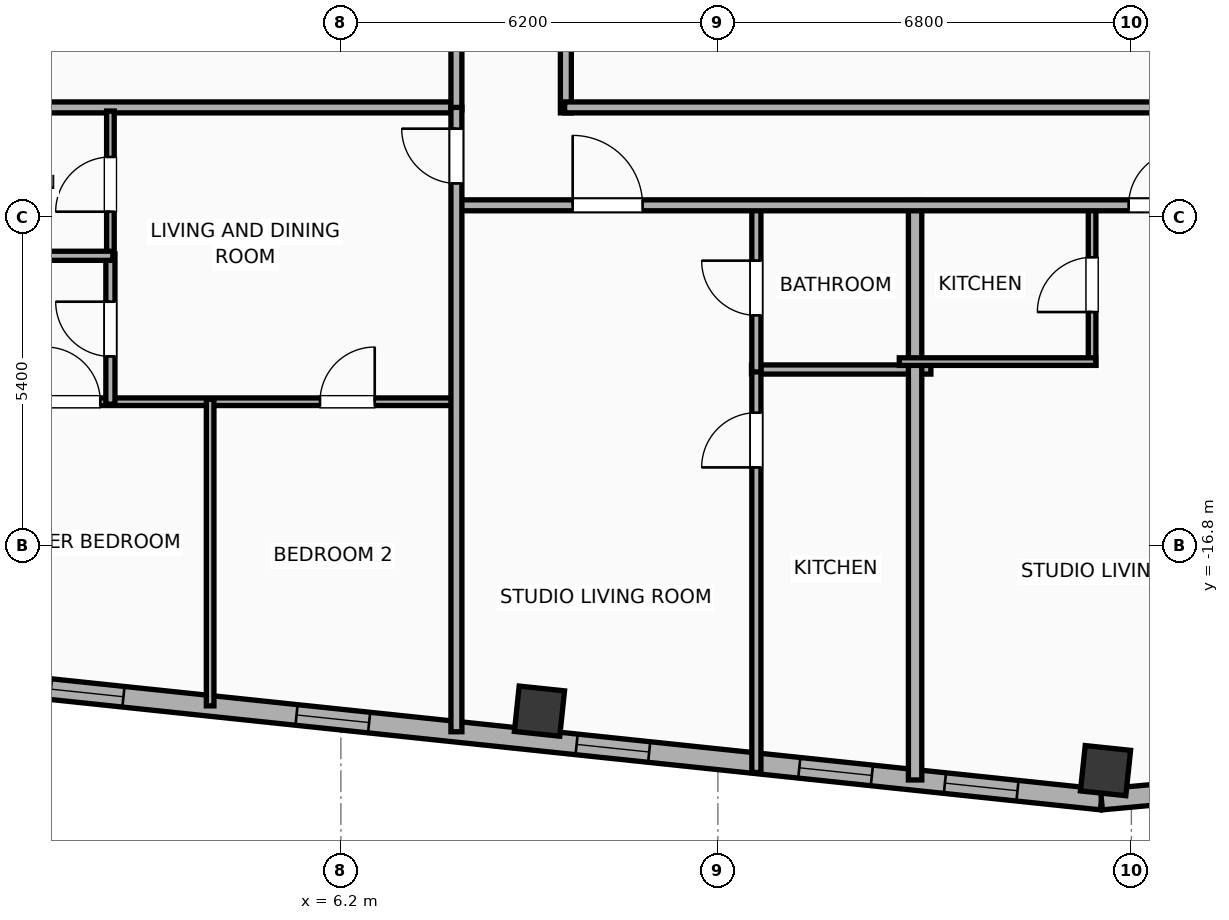
"""IFC4 building model, lengths in metres.
Left out: names, types, materials, properties, quantities, classifications, styles, units other than length and angle.
Written with IfcOpenShell. Run it as: python <this file> out.ifc"""

import sys

from ifc_helpers import new_model, si_unit, direction, frame, frame_2d, origin, origin_2d, place, context, subcontext, project, spatial, rectangle, hollow_rectangle, extrude, element, fill, save


model = new_model("IFC4")
c1 = context("Model", 3, precision=1e-05, world=origin(), true_north=direction((0.0, 1.0)))
c2 = subcontext(c1, "Body", "Model", "MODEL_VIEW")
j1 = project(units=[si_unit("LENGTHUNIT", "METRE"), si_unit("PLANEANGLEUNIT", "RADIAN")], contexts=[c1])
p1 = place(None, origin())
s1 = spatial("IfcSite", under=j1, at=p1, CompositionType="ELEMENT")
p2 = place(p1, origin())
s2 = spatial("IfcBuilding", under=s1, at=p2, CompositionType="ELEMENT")
p3 = place(p2, frame((0.0, 0.0, 287.3)))
s3 = spatial("IfcBuildingStorey", under=s2, at=p3, CompositionType="ELEMENT", Elevation=287.3)
for number, where, z_axis, x_axis in (
    (1, (9.466, -19.518, 0.0), (0.0, 0.0, 1.0), (0.995, -0.105, 0.0)),
    (2, (18.775, -20.497, 0.0), (0.0, 0.0, 1.0), (0.995, -0.105, 0.0)),
):
    element("IfcColumn", number, at=place(p3, frame(where, z_axis=z_axis, x_axis=x_axis)), inside=s3, PredefinedType="COLUMN", context=c2, shape_type="SweptSolid", body=[
        extrude(hollow_rectangle(XDim=0.75, YDim=0.75, WallThickness=0.025, at=origin_2d()), origin(), (0.0, 0.0, 1.0), 3.9),
    ])
p4 = place(p3, frame((18.708, -20.972, 0.0), z_axis=(0.0, 0.0, 1.0), x_axis=(-0.994521888554, 0.104528528102, 0.0)))
e3 = element("IfcWall", 3, at=p4, inside=s3, PredefinedType="ELEMENTEDWALL", context=c2, shape_type="SweptSolid", body=[
    extrude(rectangle(XDim=46.766, YDim=0.34, at=frame_2d((23.383, 0.0))), origin(), (0.0, 0.0, 1.0), 3.635),
])
p5 = place(p4, frame((23.833, 0.0, 0.75)))
e4 = element("IfcOpeningElement", 4, at=p5, cuts=e3, PredefinedType="OPENING", context=c2, shape_type="SweptSolid", body=[
    extrude(rectangle(XDim=2.4, YDim=2.1, at=frame_2d((1.2, 1.05))), frame((0.0, 0.18, 0.0), z_axis=(0.0, -1.0, 0.0), x_axis=(1.0, 0.0, 0.0)), (0.0, 0.0, 1.0), 0.36),
])
p6 = place(p4, frame((38.622, 0.0, 0.75)))
e5 = element("IfcOpeningElement", 5, at=p6, cuts=e3, PredefinedType="OPENING", context=c2, shape_type="SweptSolid", body=[
    extrude(rectangle(XDim=2.4, YDim=2.1, at=frame_2d((1.2, 1.05))), frame((0.0, 0.18, 0.0), z_axis=(0.0, -1.0, 0.0), x_axis=(1.0, 0.0, 0.0)), (0.0, 0.0, 1.0), 0.36),
])
p7 = place(p4, frame((44.402, 0.0, 0.75)))
e6 = element("IfcOpeningElement", 6, at=p7, cuts=e3, PredefinedType="OPENING", context=c2, shape_type="SweptSolid", body=[
    extrude(rectangle(XDim=1.2, YDim=2.05, at=frame_2d((0.6, 1.025))), frame((0.0, 0.18, 0.0), z_axis=(0.0, -1.0, 0.0), x_axis=(1.0, 0.0, 0.0)), (0.0, 0.0, 1.0), 0.36),
])
p8 = place(p4, frame((42.358, 0.0, 0.75)))
e7 = element("IfcOpeningElement", 7, at=p8, cuts=e3, PredefinedType="OPENING", context=c2, shape_type="SweptSolid", body=[
    extrude(rectangle(XDim=1.2, YDim=2.05, at=frame_2d((0.6, 1.025))), frame((0.0, 0.18, 0.0), z_axis=(0.0, -1.0, 0.0), x_axis=(1.0, 0.0, 0.0)), (0.0, 0.0, 1.0), 0.36),
])
p9 = place(p4, frame((34.933, 0.0, 0.75)))
e8 = element("IfcOpeningElement", 8, at=p9, cuts=e3, PredefinedType="OPENING", context=c2, shape_type="SweptSolid", body=[
    extrude(rectangle(XDim=1.2, YDim=2.05, at=frame_2d((0.6, 1.025))), frame((0.0, 0.18, 0.0), z_axis=(0.0, -1.0, 0.0), x_axis=(1.0, 0.0, 0.0)), (0.0, 0.0, 1.0), 0.36),
])
p10 = place(p4, frame((28.704, 0.0, 0.75)))
e9 = element("IfcOpeningElement", 9, at=p10, cuts=e3, PredefinedType="OPENING", context=c2, shape_type="SweptSolid", body=[
    extrude(rectangle(XDim=1.2, YDim=2.05, at=frame_2d((0.6, 1.025))), frame((0.0, 0.18, 0.0), z_axis=(0.0, -1.0, 0.0), x_axis=(1.0, 0.0, 0.0)), (0.0, 0.0, 1.0), 0.36),
])
p11 = place(p4, frame((30.849, 0.0, 0.75)))
e10 = element("IfcOpeningElement", 10, at=p11, cuts=e3, PredefinedType="OPENING", context=c2, shape_type="SweptSolid", body=[
    extrude(rectangle(XDim=1.2, YDim=2.05, at=frame_2d((0.6, 1.025))), frame((0.0, 0.18, 0.0), z_axis=(0.0, -1.0, 0.0), x_axis=(1.0, 0.0, 0.0)), (0.0, 0.0, 1.0), 0.36),
])
p12 = place(p4, frame((7.479, 0.0, 0.75)))
e11 = element("IfcOpeningElement", 11, at=p12, cuts=e3, PredefinedType="OPENING", context=c2, shape_type="SweptSolid", body=[
    extrude(rectangle(XDim=1.2, YDim=2.05, at=frame_2d((0.6, 1.025))), frame((0.0, 0.18, 0.0), z_axis=(0.0, -1.0, 0.0), x_axis=(1.0, 0.0, 0.0)), (0.0, 0.0, 1.0), 0.36),
])
p13 = place(p4, frame((3.796, 0.0, 0.75)))
e12 = element("IfcOpeningElement", 12, at=p13, cuts=e3, PredefinedType="OPENING", context=c2, shape_type="SweptSolid", body=[
    extrude(rectangle(XDim=1.2, YDim=2.05, at=frame_2d((0.6, 1.025))), frame((0.0, 0.18, 0.0), z_axis=(0.0, -1.0, 0.0), x_axis=(1.0, 0.0, 0.0)), (0.0, 0.0, 1.0), 0.36),
])
p14 = place(p4, frame((1.388, 0.0, 0.75)))
e13 = element("IfcOpeningElement", 13, at=p14, cuts=e3, PredefinedType="OPENING", context=c2, shape_type="SweptSolid", body=[
    extrude(rectangle(XDim=1.2, YDim=2.05, at=frame_2d((0.6, 1.025))), frame((0.0, 0.18, 0.0), z_axis=(0.0, -1.0, 0.0), x_axis=(1.0, 0.0, 0.0)), (0.0, 0.0, 1.0), 0.36),
])
p15 = place(p4, frame((20.254, 0.0, 0.75)))
e14 = element("IfcOpeningElement", 14, at=p15, cuts=e3, PredefinedType="OPENING", context=c2, shape_type="SweptSolid", body=[
    extrude(rectangle(XDim=1.2, YDim=2.05, at=frame_2d((0.6, 1.025))), frame((0.0, 0.18, 0.0), z_axis=(0.0, -1.0, 0.0), x_axis=(1.0, 0.0, 0.0)), (0.0, 0.0, 1.0), 0.36),
])
p16 = place(p4, frame((16.172, 0.0, 0.75)))
e15 = element("IfcOpeningElement", 15, at=p16, cuts=e3, PredefinedType="OPENING", context=c2, shape_type="SweptSolid", body=[
    extrude(rectangle(XDim=1.2, YDim=2.05, at=frame_2d((0.6, 1.025))), frame((0.0, 0.18, 0.0), z_axis=(0.0, -1.0, 0.0), x_axis=(1.0, 0.0, 0.0)), (0.0, 0.0, 1.0), 0.36),
])
p17 = place(p4, frame((12.11, 0.0, 0.75)))
e16 = element("IfcOpeningElement", 16, at=p17, cuts=e3, PredefinedType="OPENING", context=c2, shape_type="SweptSolid", body=[
    extrude(rectangle(XDim=1.2, YDim=2.05, at=frame_2d((0.6, 1.025))), frame((0.0, 0.18, 0.0), z_axis=(0.0, -1.0, 0.0), x_axis=(1.0, 0.0, 0.0)), (0.0, 0.0, 1.0), 0.36),
])
p18 = place(p3, frame((20.056, -20.848, 0.0), z_axis=(0.0, 0.0, 1.0), x_axis=(-0.995813013343, -0.091413579172, 0.0)))
e17 = element("IfcWall", 17, at=p18, inside=s3, PredefinedType="ELEMENTEDWALL", context=c2, shape_type="SweptSolid", body=[
    extrude(rectangle(XDim=1.354, YDim=0.34, at=frame_2d((0.677, 0.0))), origin(), (0.0, 0.0, 1.0), 3.635),
])
p19 = place(p3, frame((9.9, -9.68, 0.0), z_axis=(0.0, 0.0, 1.0), x_axis=(0.0, 1.0, 0.0)))
e18 = element("IfcWall", 18, at=p19, inside=s3, PredefinedType="PARTITIONING", context=c2, shape_type="SweptSolid", body=[
    extrude(rectangle(XDim=19.36, YDim=0.18, at=frame_2d((9.68, 0.0))), origin(), (0.0, 0.0, 1.0), 3.635),
])
p20 = place(p19, frame((8.162, 0.0, 0.0)))
e19 = element("IfcOpeningElement", 19, at=p20, cuts=e18, PredefinedType="OPENING", context=c2, shape_type="SweptSolid", body=[
    extrude(rectangle(XDim=1.1, YDim=2.05, at=frame_2d((0.55, 1.025))), frame((0.0, 0.1, 0.0), z_axis=(0.0, -1.0, 0.0), x_axis=(1.0, 0.0, 0.0)), (0.0, 0.0, 1.0), 0.2),
])
p21 = place(p3, frame((9.88, -9.59, 0.0), z_axis=(0.0, 0.0, 1.0), x_axis=(1.0, 0.0, 0.0)))
e20 = element("IfcWall", 20, at=p21, inside=s3, PredefinedType="PARTITIONING", context=c2, shape_type="SweptSolid", body=[
    extrude(rectangle(XDim=13.49, YDim=0.18, at=frame_2d((6.745, 0.0))), origin(), (0.0, 0.0, 1.0), 3.635),
])
p22 = place(p3, frame((-8.15, -9.59, 0.0), z_axis=(0.0, 0.0, 1.0), x_axis=(1.0, 0.0, 0.0)))
e21 = element("IfcWall", 21, at=p22, inside=s3, PredefinedType="PARTITIONING", context=c2, shape_type="SweptSolid", body=[
    extrude(rectangle(XDim=16.3, YDim=0.18, at=frame_2d((8.15, 0.0))), origin(), (0.0, 0.0, 1.0), 3.635),
])
p23 = place(p3, frame((8.1, -9.63, 0.0), z_axis=(0.0, 0.0, 1.0), x_axis=(0.0, 1.0, 0.0)))
e22 = element("IfcWall", 22, at=p23, inside=s3, PredefinedType="PARTITIONING", context=c2, shape_type="SweptSolid", body=[
    extrude(rectangle(XDim=19.26, YDim=0.18, at=frame_2d((9.63, 0.0))), origin(), (0.0, 0.0, 1.0), 3.635),
])
p24 = place(p3, frame((12.953, -13.9, 0.0), z_axis=(0.0, 0.0, 1.0), x_axis=(1.0, 0.0, 0.0)))
e23 = element("IfcWall", 23, at=p24, inside=s3, PredefinedType="PLUMBINGWALL", context=c2, shape_type="SweptSolid", body=[
    extrude(rectangle(XDim=2.95, YDim=0.15, at=frame_2d((1.475, 0.0))), origin(), (0.0, 0.0, 1.0), 3.635),
])
p25 = place(p3, frame((13.033, -20.527, 0.0), z_axis=(0.0, 0.0, 1.0), x_axis=(0.0, 1.0, 0.0)))
e24 = element("IfcWall", 24, at=p25, inside=s3, PredefinedType="PLUMBINGWALL", context=c2, shape_type="SweptSolid", body=[
    extrude(rectangle(XDim=6.667, YDim=0.15, at=frame_2d((3.333, 0.0))), origin(), (0.0, 0.0, 1.0), 3.635),
])
p26 = place(p25, frame((5.017, 0.0, 0.0)))
e25 = element("IfcOpeningElement", 25, at=p26, cuts=e24, PredefinedType="OPENING", context=c2, shape_type="SweptSolid", body=[
    extrude(rectangle(XDim=0.9, YDim=2.05, at=frame_2d((0.45, 1.025))), frame((0.0, 0.085, 0.0), z_axis=(0.0, -1.0, 0.0), x_axis=(1.0, 0.0, 0.0)), (0.0, 0.0, 1.0), 0.17),
])
p27 = place(p3, frame((13.033, -13.94, 0.0), z_axis=(0.0, 0.0, 1.0), x_axis=(0.0, 1.0, 0.0)))
e26 = element("IfcWall", 26, at=p27, inside=s3, PredefinedType="PLUMBINGWALL", context=c2, shape_type="SweptSolid", body=[
    extrude(rectangle(XDim=2.76, YDim=0.15, at=frame_2d((1.38, 0.0))), origin(), (0.0, 0.0, 1.0), 3.635),
])
p28 = place(p27, frame((0.93, 0.0, 0.0)))
e27 = element("IfcOpeningElement", 27, at=p28, cuts=e26, PredefinedType="OPENING", context=c2, shape_type="SweptSolid", body=[
    extrude(rectangle(XDim=0.9, YDim=2.05, at=frame_2d((0.45, 1.025))), frame((0.0, 0.085, 0.0), z_axis=(0.0, -1.0, 0.0), x_axis=(1.0, 0.0, 0.0)), (0.0, 0.0, 1.0), 0.17),
])
p29 = place(p3, frame((15.643, -20.65, 0.0), z_axis=(0.0, 0.0, 1.0), x_axis=(0.0, 1.0, 0.0)))
e28 = element("IfcWall", 28, at=p29, inside=s3, PredefinedType="PARTITIONING", context=c2, shape_type="SweptSolid", body=[
    extrude(rectangle(XDim=9.53, YDim=0.22, at=frame_2d((4.765, 0.0))), origin(), (0.0, 0.0, 1.0), 3.635),
])
p30 = place(p3, frame((18.554, -13.83, 0.0), z_axis=(0.0, 0.0, 1.0), x_axis=(0.0, 1.0, 0.0)))
e29 = element("IfcWall", 29, at=p30, inside=s3, PredefinedType="PARTITIONING", context=c2, shape_type="SweptSolid", body=[
    extrude(rectangle(XDim=2.65, YDim=0.125, at=frame_2d((1.325, 0.0))), origin(), (0.0, 0.0, 1.0), 3.635),
])
p31 = place(p30, frame((0.875, 0.0, 0.0)))
e30 = element("IfcOpeningElement", 30, at=p31, cuts=e29, PredefinedType="OPENING", context=c2, shape_type="SweptSolid", body=[
    extrude(rectangle(XDim=0.9, YDim=2.05, at=frame_2d((0.45, 1.025))), frame((0.0, 0.073, 0.0), z_axis=(0.0, -1.0, 0.0), x_axis=(1.0, 0.0, 0.0)), (0.0, 0.0, 1.0), 0.145),
])
p32 = place(p3, frame((15.383, -13.77, 0.0), z_axis=(0.0, 0.0, 1.0), x_axis=(1.0, 0.0, 0.0)))
e31 = element("IfcWall", 31, at=p32, inside=s3, PredefinedType="PARTITIONING", context=c2, shape_type="SweptSolid", body=[
    extrude(rectangle(XDim=3.231, YDim=0.125, at=frame_2d((1.615, 0.0))), origin(), (0.0, 0.0, 1.0), 3.635),
])
p33 = place(p3, frame((8.08, -11.2, 0.0), z_axis=(0.0, 0.0, 1.0), x_axis=(1.0, 0.0, 0.0)))
e32 = element("IfcWall", 32, at=p33, inside=s3, PredefinedType="PARTITIONING", context=c2, shape_type="SweptSolid", body=[
    extrude(rectangle(XDim=15.121, YDim=0.18, at=frame_2d((7.56, 0.0))), origin(), (0.0, 0.0, 1.0), 3.635),
])
p34 = place(p33, frame((1.932, 0.0, 0.0)))
e33 = element("IfcOpeningElement", 33, at=p34, cuts=e32, PredefinedType="OPENING", context=c2, shape_type="SweptSolid", body=[
    extrude(rectangle(XDim=1.15, YDim=2.05, at=frame_2d((0.575, 1.025))), frame((0.0, 0.1, 0.0), z_axis=(0.0, -1.0, 0.0), x_axis=(1.0, 0.0, 0.0)), (0.0, 0.0, 1.0), 0.2),
])
p35 = place(p33, frame((11.075, 0.0, 0.0)))
e34 = element("IfcOpeningElement", 34, at=p35, cuts=e32, PredefinedType="OPENING", context=c2, shape_type="SweptSolid", body=[
    extrude(rectangle(XDim=0.9, YDim=2.05, at=frame_2d((0.45, 1.025))), frame((0.0, 0.1, 0.0), z_axis=(0.0, -1.0, 0.0), x_axis=(1.0, 0.0, 0.0)), (0.0, 0.0, 1.0), 0.2),
])
p36 = place(p3, frame((0.02, -14.43, 0.0), z_axis=(0.0, 0.0, 1.0), x_axis=(1.0, 0.0, 0.0)))
e35 = element("IfcWall", 35, at=p36, inside=s3, PredefinedType="PARTITIONING", context=c2, shape_type="SweptSolid", body=[
    extrude(rectangle(XDim=8.06, YDim=0.125, at=frame_2d((4.03, 0.0))), origin(), (0.0, 0.0, 1.0), 3.635),
])
p37 = place(p36, frame((1.323, 0.0, 0.0)))
e36 = element("IfcOpeningElement", 36, at=p37, cuts=e35, PredefinedType="OPENING", context=c2, shape_type="SweptSolid", body=[
    extrude(rectangle(XDim=0.9, YDim=2.05, at=frame_2d((0.45, 1.025))), frame((0.0, 0.073, 0.0), z_axis=(0.0, -1.0, 0.0), x_axis=(1.0, 0.0, 0.0)), (0.0, 0.0, 1.0), 0.145),
])
p38 = place(p36, frame((5.837, 0.0, 0.0)))
e37 = element("IfcOpeningElement", 37, at=p38, cuts=e35, PredefinedType="OPENING", context=c2, shape_type="SweptSolid", body=[
    extrude(rectangle(XDim=0.9, YDim=2.05, at=frame_2d((0.45, 1.025))), frame((0.0, 0.073, 0.0), z_axis=(0.0, -1.0, 0.0), x_axis=(1.0, 0.0, 0.0)), (0.0, 0.0, 1.0), 0.145),
])
p39 = place(p3, frame((2.41, -12.06, 0.0), z_axis=(0.0, 0.0, 1.0), x_axis=(0.0, 1.0, 0.0)))
e38 = element("IfcWall", 38, at=p39, inside=s3, PredefinedType="PARTITIONING", context=c2, shape_type="SweptSolid", body=[
    extrude(rectangle(XDim=2.41, YDim=0.125, at=frame_2d((1.205, 0.0))), origin(), (0.0, 0.0, 1.0), 3.075),
])
p40 = place(p39, frame((0.755, 0.0, 0.0)))
e39 = element("IfcOpeningElement", 39, at=p40, cuts=e38, PredefinedType="OPENING", context=c2, shape_type="SweptSolid", body=[
    extrude(rectangle(XDim=0.9, YDim=2.05, at=frame_2d((0.45, 1.025))), frame((0.0, 0.073, 0.0), z_axis=(0.0, -1.0, 0.0), x_axis=(1.0, 0.0, 0.0)), (0.0, 0.0, 1.0), 0.145),
])
p41 = place(p3, frame((2.41, -14.47, 0.0), z_axis=(0.0, 0.0, 1.0), x_axis=(0.0, 1.0, 0.0)))
e40 = element("IfcWall", 40, at=p41, inside=s3, PredefinedType="PLUMBINGWALL", context=c2, shape_type="SweptSolid", body=[
    extrude(rectangle(XDim=2.47, YDim=0.15, at=frame_2d((1.235, 0.0))), origin(), (0.0, 0.0, 1.0), 3.075),
])
p42 = place(p41, frame((0.785, 0.0, 0.0)))
e41 = element("IfcOpeningElement", 41, at=p42, cuts=e40, PredefinedType="OPENING", context=c2, shape_type="SweptSolid", body=[
    extrude(rectangle(XDim=0.9, YDim=2.05, at=frame_2d((0.45, 1.025))), frame((0.0, 0.085, 0.0), z_axis=(0.0, -1.0, 0.0), x_axis=(1.0, 0.0, 0.0)), (0.0, 0.0, 1.0), 0.17),
])
p43 = place(p3, frame((0.02, -12.03, 0.0), z_axis=(0.0, 0.0, 1.0), x_axis=(1.0, 0.0, 0.0)))
e42 = element("IfcWall", 42, at=p43, inside=s3, PredefinedType="PLUMBINGWALL", context=c2, shape_type="SweptSolid", body=[
    extrude(rectangle(XDim=2.43, YDim=0.15, at=frame_2d((1.215, 0.0))), origin(), (0.0, 0.0, 1.0), 3.635),
])
p44 = place(p3, frame((4.05, -19.432, 0.0), z_axis=(0.0, 0.0, 1.0), x_axis=(0.0, 1.0, 0.0)))
e43 = element("IfcWall", 43, at=p44, inside=s3, PredefinedType="PARTITIONING", context=c2, shape_type="SweptSolid", body=[
    extrude(rectangle(XDim=5.042, YDim=0.125, at=frame_2d((2.521, 0.0))), origin(), (0.0, 0.0, 1.0), 3.635),
])
p45 = place(p3, frame((8.1, -19.857, 0.0), z_axis=(0.0, 0.0, 1.0), x_axis=(0.0, 1.0, 0.0)))
e44 = element("IfcWall", 44, at=p45, inside=s3, PredefinedType="PARTITIONING", context=c2, shape_type="SweptSolid", body=[
    extrude(rectangle(XDim=10.267, YDim=0.18, at=frame_2d((5.134, 0.0))), origin(), (0.0, 0.0, 1.0), 3.635),
])
p46 = place(p45, frame((9.017, 0.0, 0.0)))
e45 = element("IfcOpeningElement", 45, at=p46, cuts=e44, PredefinedType="OPENING", context=c2, shape_type="SweptSolid", body=[
    extrude(rectangle(XDim=0.9, YDim=2.05, at=frame_2d((0.45, 1.025))), frame((0.0, 0.1, 0.0), z_axis=(0.0, -1.0, 0.0), x_axis=(1.0, 0.0, 0.0)), (0.0, 0.0, 1.0), 0.2),
])
p47 = place(p12, origin())
e46 = element("IfcWindow", 46, at=p47, inside=s3, PartitioningType="SINGLE_PANEL", PredefinedType="WINDOW", context=c2, shape_type="SweptSolid", body=[
    extrude(rectangle(XDim=1.2, YDim=2.05, at=frame_2d((0.6, 1.025))), frame((0.0, 0.03, 0.0), z_axis=(0.0, -1.0, 0.0), x_axis=(1.0, 0.0, 0.0)), (0.0, 0.0, 1.0), 0.06),
])
fill(e11, e46)
p48 = place(p13, origin())
e47 = element("IfcWindow", 47, at=p48, inside=s3, PartitioningType="SINGLE_PANEL", PredefinedType="WINDOW", context=c2, shape_type="SweptSolid", body=[
    extrude(rectangle(XDim=1.2, YDim=2.05, at=frame_2d((0.6, 1.025))), frame((0.0, 0.03, 0.0), z_axis=(0.0, -1.0, 0.0), x_axis=(1.0, 0.0, 0.0)), (0.0, 0.0, 1.0), 0.06),
])
fill(e12, e47)
p49 = place(p14, origin())
e48 = element("IfcWindow", 48, at=p49, inside=s3, PartitioningType="SINGLE_PANEL", PredefinedType="WINDOW", context=c2, shape_type="SweptSolid", body=[
    extrude(rectangle(XDim=1.2, YDim=2.05, at=frame_2d((0.6, 1.025))), frame((0.0, 0.03, 0.0), z_axis=(0.0, -1.0, 0.0), x_axis=(1.0, 0.0, 0.0)), (0.0, 0.0, 1.0), 0.06),
])
fill(e13, e48)
p50 = place(p16, origin())
e49 = element("IfcWindow", 49, at=p50, inside=s3, PartitioningType="SINGLE_PANEL", PredefinedType="WINDOW", context=c2, shape_type="SweptSolid", body=[
    extrude(rectangle(XDim=1.2, YDim=2.05, at=frame_2d((0.6, 1.025))), frame((0.0, 0.03, 0.0), z_axis=(0.0, -1.0, 0.0), x_axis=(1.0, 0.0, 0.0)), (0.0, 0.0, 1.0), 0.06),
])
fill(e15, e49)
p51 = place(p17, origin())
e50 = element("IfcWindow", 50, at=p51, inside=s3, PartitioningType="SINGLE_PANEL", PredefinedType="WINDOW", context=c2, shape_type="SweptSolid", body=[
    extrude(rectangle(XDim=1.2, YDim=2.05, at=frame_2d((0.6, 1.025))), frame((0.0, 0.03, 0.0), z_axis=(0.0, -1.0, 0.0), x_axis=(1.0, 0.0, 0.0)), (0.0, 0.0, 1.0), 0.06),
])
fill(e16, e50)
p52 = place(p26, origin())
e51 = element("IfcDoor", 51, at=p52, inside=s3, OperationType="SINGLE_SWING_LEFT", PredefinedType="DOOR", context=c2, shape_type="SweptSolid", body=[
    extrude(rectangle(XDim=0.9, YDim=2.05, at=frame_2d((0.45, 1.025))), frame((0.0, 0.025, 0.0), z_axis=(0.0, -1.0, 0.0), x_axis=(1.0, 0.0, 0.0)), (0.0, 0.0, 1.0), 0.05),
])
fill(e25, e51)
p53 = place(p28, origin())
e52 = element("IfcDoor", 52, at=p53, inside=s3, OperationType="SINGLE_SWING_RIGHT", PredefinedType="DOOR", context=c2, shape_type="SweptSolid", body=[
    extrude(rectangle(XDim=0.9, YDim=2.05, at=frame_2d((0.45, 1.025))), frame((0.0, 0.025, 0.0), z_axis=(0.0, -1.0, 0.0), x_axis=(1.0, 0.0, 0.0)), (0.0, 0.0, 1.0), 0.05),
])
fill(e27, e52)
p54 = place(p31, origin())
e53 = element("IfcDoor", 53, at=p54, inside=s3, OperationType="SINGLE_SWING_LEFT", PredefinedType="DOOR", context=c2, shape_type="SweptSolid", body=[
    extrude(rectangle(XDim=0.9, YDim=2.05, at=frame_2d((0.45, 1.025))), frame((0.0, 0.025, 0.0), z_axis=(0.0, -1.0, 0.0), x_axis=(1.0, 0.0, 0.0)), (0.0, 0.0, 1.0), 0.05),
])
fill(e30, e53)
p55 = place(p34, origin())
e54 = element("IfcDoor", 54, at=p55, inside=s3, OperationType="SINGLE_SWING_LEFT", PredefinedType="DOOR", context=c2, shape_type="SweptSolid", body=[
    extrude(rectangle(XDim=1.15, YDim=2.05, at=frame_2d((0.575, 1.025))), frame((0.0, 0.025, 0.0), z_axis=(0.0, -1.0, 0.0), x_axis=(1.0, 0.0, 0.0)), (0.0, 0.0, 1.0), 0.05),
])
fill(e33, e54)
p56 = place(p35, origin())
e55 = element("IfcDoor", 55, at=p56, inside=s3, OperationType="SINGLE_SWING_RIGHT", PredefinedType="DOOR", context=c2, shape_type="SweptSolid", body=[
    extrude(rectangle(XDim=0.9, YDim=2.05, at=frame_2d((0.45, 1.025))), frame((0.0, 0.025, 0.0), z_axis=(0.0, -1.0, 0.0), x_axis=(1.0, 0.0, 0.0)), (0.0, 0.0, 1.0), 0.05),
])
fill(e34, e55)
p57 = place(p37, origin())
e56 = element("IfcDoor", 56, at=p57, inside=s3, OperationType="SINGLE_SWING_LEFT", PredefinedType="DOOR", context=c2, shape_type="SweptSolid", body=[
    extrude(rectangle(XDim=0.9, YDim=2.05, at=frame_2d((0.45, 1.025))), frame((0.0, 0.025, 0.0), z_axis=(0.0, -1.0, 0.0), x_axis=(1.0, 0.0, 0.0)), (0.0, 0.0, 1.0), 0.05),
])
fill(e36, e56)
p58 = place(p38, origin())
e57 = element("IfcDoor", 57, at=p58, inside=s3, OperationType="SINGLE_SWING_RIGHT", PredefinedType="DOOR", context=c2, shape_type="SweptSolid", body=[
    extrude(rectangle(XDim=0.9, YDim=2.05, at=frame_2d((0.45, 1.025))), frame((0.0, 0.025, 0.0), z_axis=(0.0, -1.0, 0.0), x_axis=(1.0, 0.0, 0.0)), (0.0, 0.0, 1.0), 0.05),
])
fill(e37, e57)
p59 = place(p40, origin())
e58 = element("IfcDoor", 58, at=p59, inside=s3, OperationType="SINGLE_SWING_LEFT", PredefinedType="DOOR", context=c2, shape_type="SweptSolid", body=[
    extrude(rectangle(XDim=0.9, YDim=2.05, at=frame_2d((0.45, 1.025))), frame((0.0, 0.025, 0.0), z_axis=(0.0, -1.0, 0.0), x_axis=(1.0, 0.0, 0.0)), (0.0, 0.0, 1.0), 0.05),
])
fill(e39, e58)
p60 = place(p42, origin())
e59 = element("IfcDoor", 59, at=p60, inside=s3, OperationType="SINGLE_SWING_RIGHT", PredefinedType="DOOR", context=c2, shape_type="SweptSolid", body=[
    extrude(rectangle(XDim=0.9, YDim=2.05, at=frame_2d((0.45, 1.025))), frame((0.0, 0.025, 0.0), z_axis=(0.0, -1.0, 0.0), x_axis=(1.0, 0.0, 0.0)), (0.0, 0.0, 1.0), 0.05),
])
fill(e41, e59)
p61 = place(p46, origin())
e60 = element("IfcDoor", 60, at=p61, inside=s3, OperationType="SINGLE_SWING_RIGHT", PredefinedType="DOOR", context=c2, shape_type="SweptSolid", body=[
    extrude(rectangle(XDim=0.9, YDim=2.05, at=frame_2d((0.45, 1.025))), frame((0.0, 0.025, 0.0), z_axis=(0.0, -1.0, 0.0), x_axis=(1.0, 0.0, 0.0)), (0.0, 0.0, 1.0), 0.05),
])
fill(e45, e60)
save(model, sys.argv[1])
